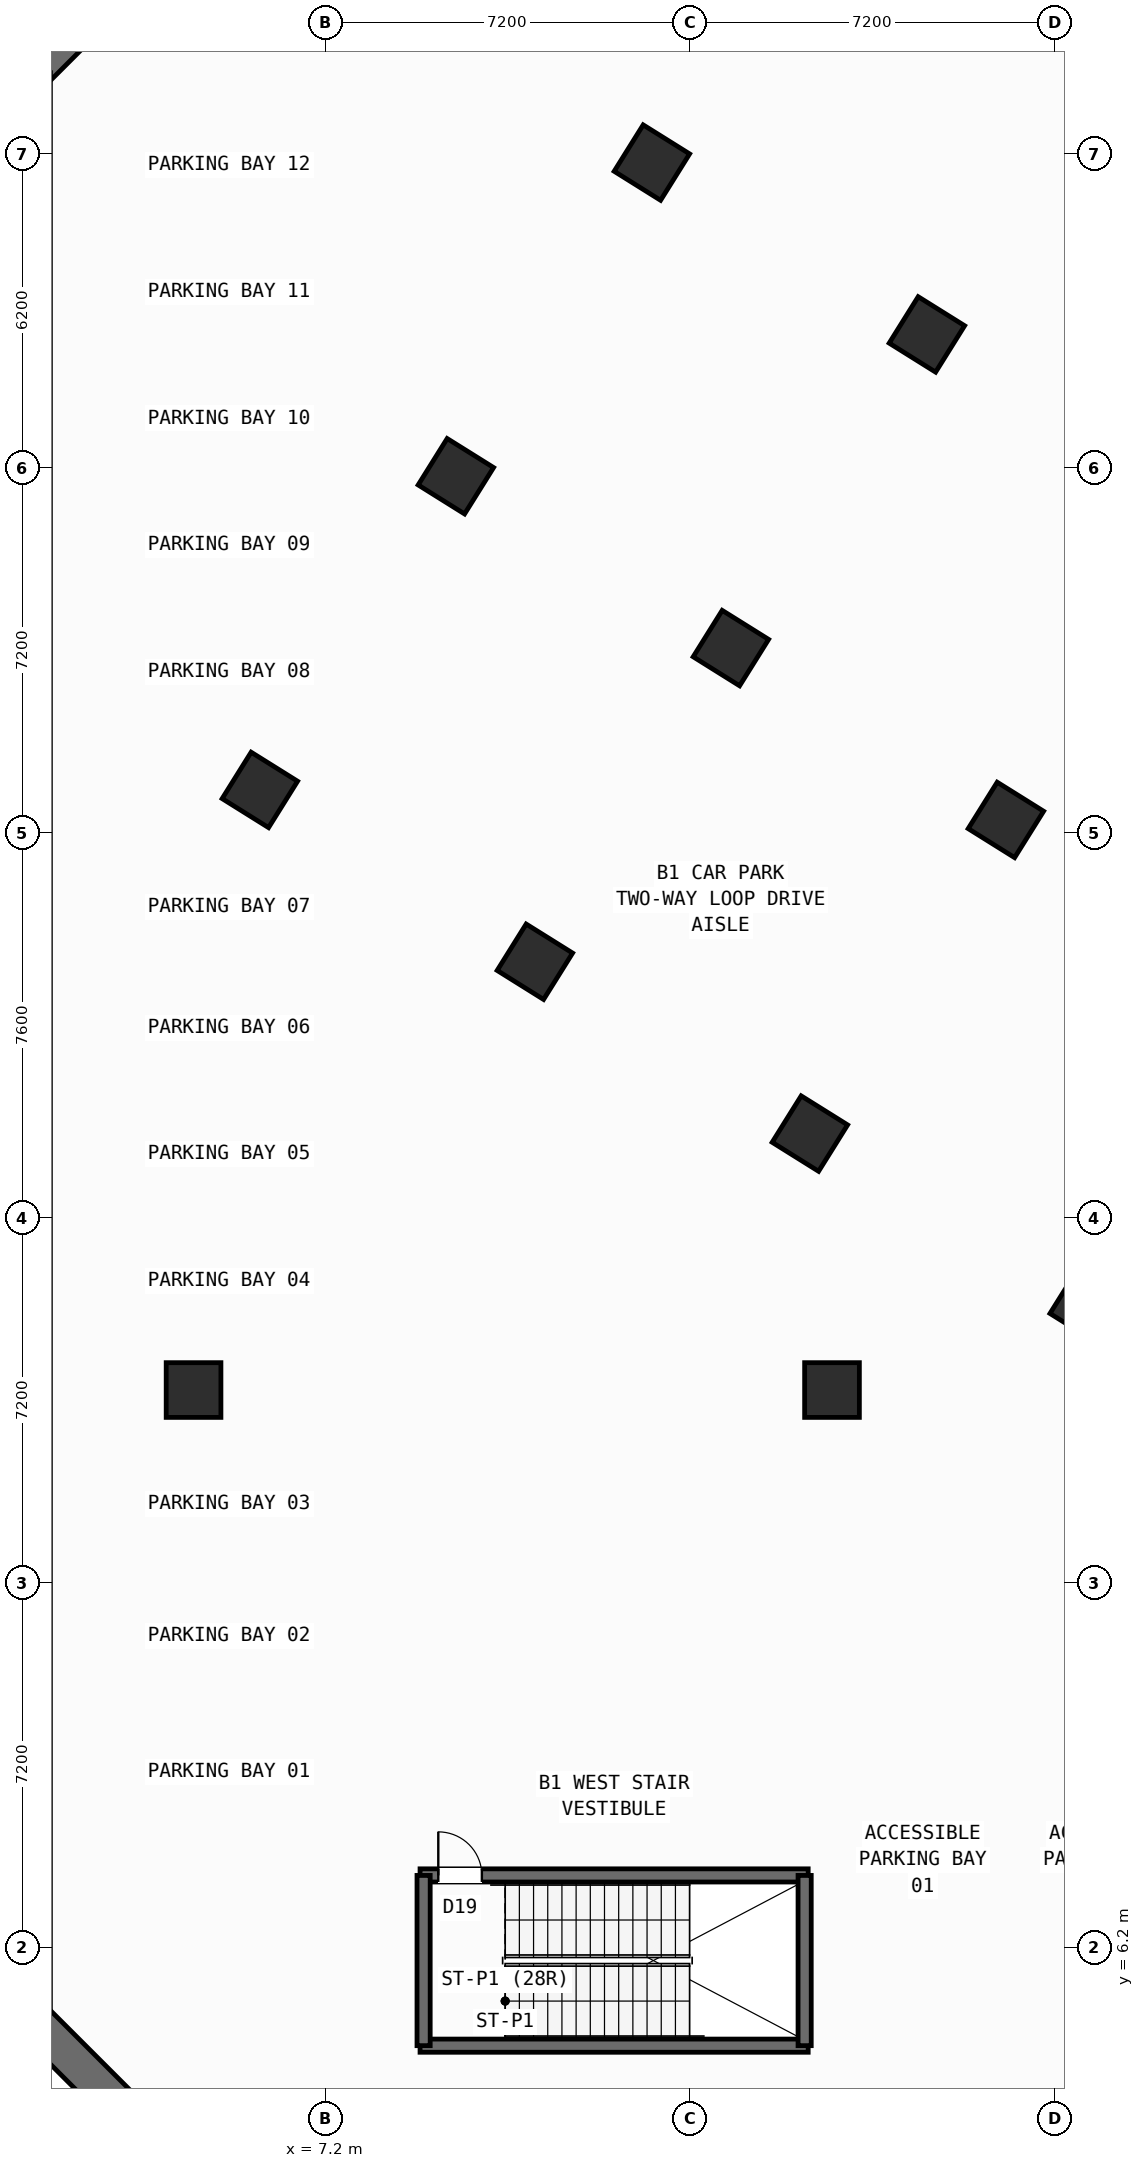
"""IFC4 building model, lengths in metres.
Left out: names, types, materials, properties, quantities, classifications, styles, units other than length and angle.
Written with IfcOpenShell. Run it as: python <this file> out.ifc"""

import sys

from ifc_helpers import new_model, si_unit, direction, frame, frame_2d, origin, origin_2d, place, context, subcontext, project, spatial, rectangle, hollow_rectangle, extrude, source, transform, mapped, element, fill, save


model = new_model("IFC4")
c1 = context("Model", 3, precision=1e-05, world=origin(), true_north=direction((0.0, 1.0)))
c2 = subcontext(c1, "Body", "Model", "MODEL_VIEW")
j1 = project(units=[si_unit("LENGTHUNIT", "METRE"), si_unit("PLANEANGLEUNIT", "RADIAN")], contexts=[c1])
p1 = place(None, origin())
s1 = spatial("IfcSite", under=j1, at=p1, CompositionType="ELEMENT")
p2 = place(p1, origin())
s2 = spatial("IfcBuilding", under=s1, at=p2, CompositionType="ELEMENT")
p3 = place(p2, frame((0.0, 0.0, -4.8)))
s3 = spatial("IfcBuildingStorey", under=s2, at=p3, CompositionType="ELEMENT", Elevation=-4.8)
for number, where, z_axis, x_axis in (
    (1, (4.8, 46.6, 0.0), (0.0, 0.0, 1.0), (-0.707, -0.707, 0.0)),
    (2, (1.4, 4.8, 0.0), (0.0, 0.0, 1.0), (0.707, -0.707, 0.0)),
):
    element("IfcWall", number, at=place(p3, frame(where, z_axis=z_axis, x_axis=x_axis)), inside=s3, PredefinedType="USERDEFINED", context=c2, shape_type="SweptSolid", body=[
        extrude(rectangle(XDim=4.809, YDim=0.75, at=frame_2d((2.404, 0.0))), origin(), (0.0, 0.0, 1.0), 4.45),
    ])
m1 = source(origin(), c2, "Body", "SweptSolid", [
    extrude(hollow_rectangle(XDim=1.08, YDim=1.08, WallThickness=0.04, at=origin_2d()), origin(), (0.0, 0.0, 1.0), 4.8),
])
for number, where, z_axis, x_axis in (
    (3, (4.6, 17.2, 0.0), (0.0, 0.0, 1.0), (1.0, 0.0, 0.0)),
    (4, (17.2, 17.2, 0.0), (0.0, 0.0, 1.0), (1.0, 0.0, 0.0)),
    (5, (20.632, 28.452, 0.0), (0.0, 0.0, 1.0), (-0.848, 0.53, 0.0)),
    (6, (16.764, 22.261, 0.0), (0.0, 0.0, 1.0), (-0.848, 0.53, 0.0)),
    (7, (19.073, 38.034, 0.0), (0.0, 0.0, 1.0), (-0.848, 0.53, 0.0)),
    (8, (15.205, 31.844, 0.0), (0.0, 0.0, 1.0), (-0.848, 0.53, 0.0)),
    (9, (11.336, 25.653, 0.0), (0.0, 0.0, 1.0), (-0.848, 0.53, 0.0)),
    (10, (13.646, 41.426, 0.0), (0.0, 0.0, 1.0), (-0.848, 0.53, 0.0)),
    (11, (9.777, 35.235, 0.0), (0.0, 0.0, 1.0), (-0.848, 0.53, 0.0)),
    (12, (5.909, 29.044, 0.0), (0.0, 0.0, 1.0), (-0.848, 0.53, 0.0)),
):
    element("IfcColumn", number, at=place(p3, frame(where, z_axis=z_axis, x_axis=x_axis)), inside=s3, PredefinedType="COLUMN", context=c2, shape_type="MappedRepresentation", body=[
        mapped(m1, transform((0.0, 0.0, 0.0), scale=1.0)),
    ])
m2 = source(origin(), c2, "Body", "SweptSolid", [
    extrude(hollow_rectangle(XDim=1.0, YDim=1.0, WallThickness=0.04, at=origin_2d()), origin(), (0.0, 0.0, 1.0), 4.8),
])
p4 = place(p3, frame((22.191, 18.87, 0.0), z_axis=(0.0, 0.0, 1.0), x_axis=(-0.848048096156, 0.529919264233, 0.0)))
e13 = element("IfcColumn", 13, at=p4, inside=s3, PredefinedType="COLUMN", context=c2, shape_type="MappedRepresentation", body=[
    mapped(m2, transform((0.0, 0.0, 0.0), scale=1.0)),
])
p5 = place(p3, frame((9.07, 7.62, 0.0), z_axis=(0.0, 0.0, 1.0), x_axis=(1.0, 0.0, 0.0)))
e14 = element("IfcWall", 14, at=p5, inside=s3, PredefinedType="SHEAR", context=c2, shape_type="SweptSolid", body=[
    extrude(rectangle(XDim=7.66, YDim=0.26, at=frame_2d((3.83, 0.0))), origin(), (0.0, 0.0, 1.0), 4.6),
])
p6 = place(p5, frame((0.36, 0.0, 0.0)))
e15 = element("IfcOpeningElement", 15, at=p6, cuts=e14, PredefinedType="OPENING", context=c2, shape_type="SweptSolid", body=[
    extrude(rectangle(XDim=0.86, YDim=2.05, at=frame_2d((0.43, 1.025))), frame((0.0, 0.14, 0.0), z_axis=(0.0, -1.0, 0.0), x_axis=(1.0, 0.0, 0.0)), (0.0, 0.0, 1.0), 0.28),
])
p7 = place(p3, frame((9.07, 4.26, 0.0), z_axis=(0.0, 0.0, 1.0), x_axis=(1.0, 0.0, 0.0)))
e16 = element("IfcWall", 16, at=p7, inside=s3, PredefinedType="SHEAR", context=c2, shape_type="SweptSolid", body=[
    extrude(rectangle(XDim=7.66, YDim=0.26, at=frame_2d((3.83, 0.0))), origin(), (0.0, 0.0, 1.0), 4.6),
])
for number, where, z_axis, x_axis in (
    (17, (9.14, 4.26, 0.0), (0.0, 0.0, 1.0), (0.0, 1.0, 0.0)),
    (18, (16.66, 4.26, 0.0), (0.0, 0.0, 1.0), (0.0, 1.0, 0.0)),
):
    element("IfcWall", number, at=place(p3, frame(where, z_axis=z_axis, x_axis=x_axis)), inside=s3, PredefinedType="SHEAR", context=c2, shape_type="SweptSolid", body=[
        extrude(rectangle(XDim=3.36, YDim=0.26, at=frame_2d((1.68, 0.0))), origin(), (0.0, 0.0, 1.0), 4.6),
    ])
m3 = source(origin(), c2, "Body", "SweptSolid", [
    extrude(rectangle(XDim=0.86, YDim=2.05, at=frame_2d((0.43, 1.025))), frame((0.0, 0.025, 0.0), z_axis=(0.0, -1.0, 0.0), x_axis=(1.0, 0.0, 0.0)), (0.0, 0.0, 1.0), 0.05),
])
p8 = place(p6, origin())
e19 = element("IfcDoor", 19, at=p8, inside=s3, OperationType="SINGLE_SWING_LEFT", PredefinedType="DOOR", context=c2, shape_type="MappedRepresentation", body=[
    mapped(m3, transform((0.0, 0.0, 0.0), scale=1.0)),
])
fill(e15, e19)
save(model, sys.argv[1])
